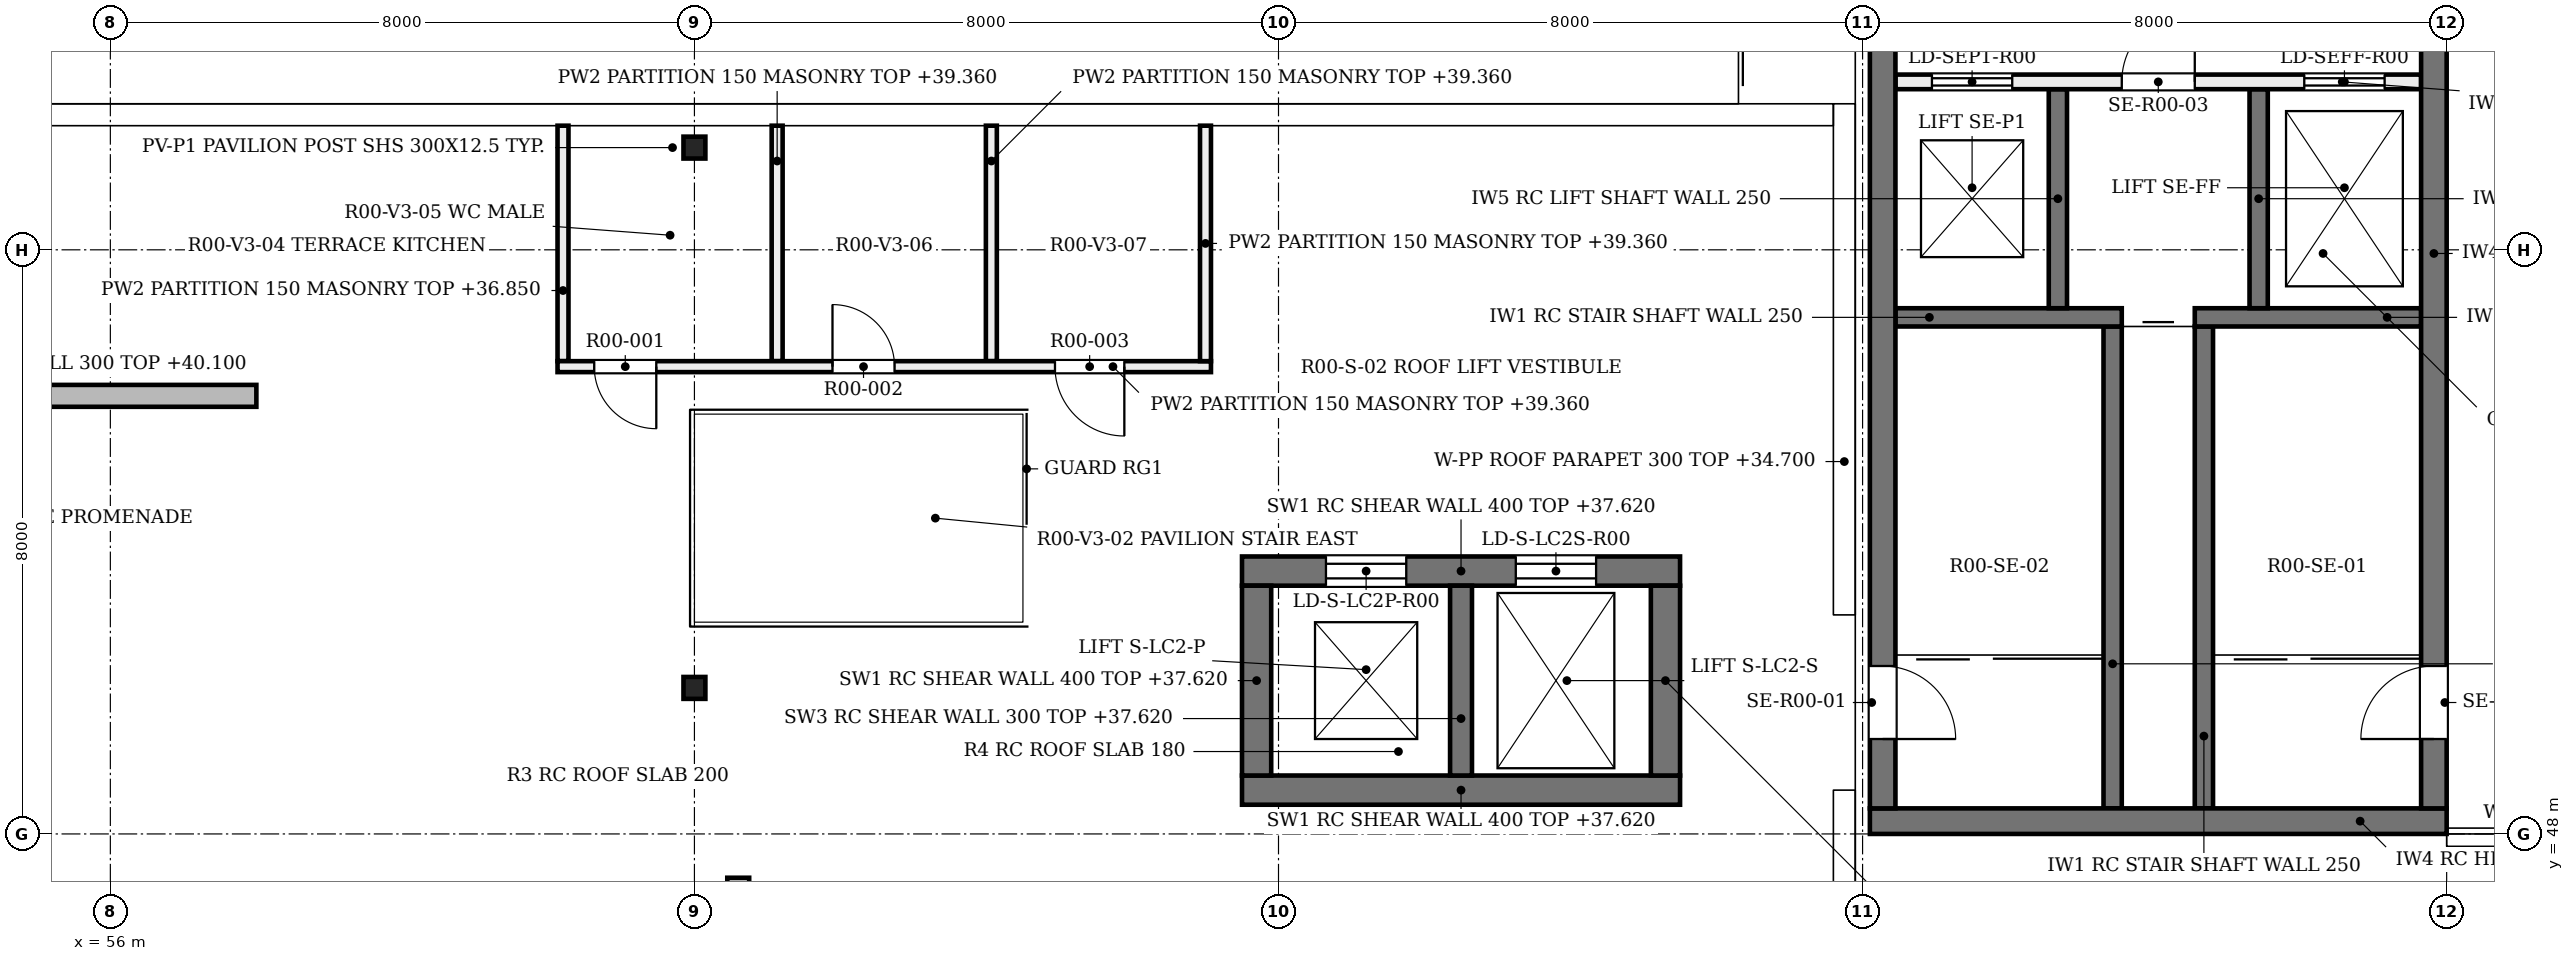
"""IFC4 building model, lengths in metres.
Left out: names, types, materials, properties, quantities, classifications, styles, units other than length and angle.
Written with IfcOpenShell. Run it as: python <this file> out.ifc"""

import sys

from ifc_helpers import new_model, si_unit, direction, frame, frame_2d, origin, origin_2d, place, context, subcontext, project, spatial, polyline, rectangle, hollow_rectangle, outline, extrude, element, fill, save


model = new_model("IFC4")
c1 = context("Model", 3, precision=1e-05, world=origin(), true_north=direction((0.0, 1.0)))
c2 = subcontext(c1, "Body", "Model", "MODEL_VIEW")
j1 = project(units=[si_unit("LENGTHUNIT", "METRE"), si_unit("PLANEANGLEUNIT", "RADIAN")], contexts=[c1])
p1 = place(None, origin())
s1 = spatial("IfcSite", under=j1, at=p1, CompositionType="ELEMENT")
p2 = place(p1, origin())
s2 = spatial("IfcBuilding", under=s1, at=p2, CompositionType="ELEMENT")
p3 = place(p2, frame((0.0, 0.0, 33.6)))
s3 = spatial("IfcBuildingStorey", under=s2, at=p3, CompositionType="ELEMENT", Elevation=33.6)
p4 = place(p3, frame((71.5, 48.6, 0.0), z_axis=(0.0, 0.0, 1.0), x_axis=(1.0, 0.0, 0.0)))
e1 = element("IfcWall", 1, at=p4, inside=s3, PredefinedType="SHEAR", context=c2, shape_type="SweptSolid", body=[
    extrude(rectangle(XDim=6.0, YDim=0.4, at=frame_2d((3.0, 0.0))), origin(), (0.0, 0.0, 1.0), 4.02),
])
p5 = place(p3, frame((71.5, 51.6, 0.0), z_axis=(0.0, 0.0, 1.0), x_axis=(1.0, 0.0, 0.0)))
e2 = element("IfcWall", 2, at=p5, inside=s3, PredefinedType="SHEAR", context=c2, shape_type="SweptSolid", body=[
    extrude(rectangle(XDim=6.0, YDim=0.4, at=frame_2d((3.0, 0.0))), origin(), (0.0, 0.0, 1.0), 4.02),
])
p6 = place(p5, frame((1.15, 0.0, 0.0)))
e3 = element("IfcOpeningElement", 3, at=p6, cuts=e2, PredefinedType="OPENING", context=c2, shape_type="SweptSolid", body=[
    extrude(rectangle(XDim=1.1, YDim=2.1, at=frame_2d((0.55, 1.05))), frame((0.0, 0.21, 0.0), z_axis=(0.0, -1.0, 0.0), x_axis=(1.0, 0.0, 0.0)), (0.0, 0.0, 1.0), 0.42),
])
p7 = place(p5, frame((3.75, 0.0, 0.0)))
e4 = element("IfcOpeningElement", 4, at=p7, cuts=e2, PredefinedType="OPENING", context=c2, shape_type="SweptSolid", body=[
    extrude(rectangle(XDim=1.1, YDim=2.1, at=frame_2d((0.55, 1.05))), frame((0.0, 0.21, 0.0), z_axis=(0.0, -1.0, 0.0), x_axis=(1.0, 0.0, 0.0)), (0.0, 0.0, 1.0), 0.42),
])
for number, where, z_axis, x_axis in (
    (5, (71.7, 48.8, 0.0), (0.0, 0.0, 1.0), (0.0, 1.0, 0.0)),
    (6, (77.3, 48.8, 0.0), (0.0, 0.0, 1.0), (0.0, 1.0, 0.0)),
):
    element("IfcWall", number, at=place(p3, frame(where, z_axis=z_axis, x_axis=x_axis)), inside=s3, PredefinedType="SHEAR", context=c2, shape_type="SweptSolid", body=[
        extrude(rectangle(XDim=2.6, YDim=0.4, at=frame_2d((1.3, 0.0))), origin(), (0.0, 0.0, 1.0), 4.02),
    ])
p8 = place(p3, frame((74.5, 48.8, 0.0), z_axis=(0.0, 0.0, 1.0), x_axis=(0.0, 1.0, 0.0)))
e7 = element("IfcWall", 7, at=p8, inside=s3, PredefinedType="SHEAR", context=c2, shape_type="SweptSolid", body=[
    extrude(rectangle(XDim=2.6, YDim=0.3, at=frame_2d((1.3, 0.0))), origin(), (0.0, 0.0, 1.0), 4.02),
])
for number, where, z_axis, x_axis in (
    (8, (64.0, 50.0, 0.0), (0.0, 0.0, 1.0), (1.0, 0.0, 0.0)),
    (9, (64.0, 57.4, 0.0), (0.0, 0.0, 1.0), (1.0, 0.0, 0.0)),
):
    element("IfcColumn", number, at=place(p3, frame(where, z_axis=z_axis, x_axis=x_axis)), inside=s3, PredefinedType="COLUMN", context=c2, shape_type="SweptSolid", body=[
        extrude(hollow_rectangle(XDim=0.3, YDim=0.3, WallThickness=0.012, InnerFilletRadius=0.012, OuterFilletRadius=0.019, at=origin_2d()), origin(), (0.0, 0.0, 1.0), 3.5),
    ])
p9 = place(p3, frame((64.6, 42.4, 0.0), z_axis=(0.0, 0.0, 1.0), x_axis=(0.0, 1.0, 0.0)))
e10 = element("IfcWall", 10, at=p9, inside=s3, PredefinedType="SOLIDWALL", context=c2, shape_type="SweptSolid", body=[
    extrude(outline(polyline([(0.0, 0.0), (5.0, 0.0), (5.0, 12.8), (1.6, 16.8), (0.0, 17.4), (0.0, 0.0)])), frame((0.0, 0.15, 0.0), z_axis=(0.0, -1.0, 0.0), x_axis=(1.0, 0.0, 0.0)), (0.0, 0.0, 1.0), 0.3),
])
p10 = place(p3, frame((88.0, 47.955, 0.0), z_axis=(0.0, 0.0, 1.0), x_axis=(1.0, 0.0, 0.0)))
e11 = element("IfcWall", 11, at=p10, inside=s3, PredefinedType="PARAPET", context=c2, shape_type="SweptSolid", body=[
    extrude(rectangle(XDim=8.0, YDim=0.25, at=frame_2d((4.0, 0.0))), origin(), (0.0, 0.0, 1.0), 1.1),
])
p11 = place(p3, frame((79.75, 42.0, 0.0), z_axis=(0.0, 0.0, 1.0), x_axis=(0.0, 1.0, 0.0)))
e12 = element("IfcWall", 12, at=p11, inside=s3, PredefinedType="PARAPET", context=c2, shape_type="SweptSolid", body=[
    extrude(rectangle(XDim=6.6, YDim=0.3, at=frame_2d((3.3, 0.0))), origin(), (0.0, 0.0, 1.0), 1.1),
])
p12 = place(p3, frame((79.75, 51.0, 0.0), z_axis=(0.0, 0.0, 1.0), x_axis=(0.0, 1.0, 0.0)))
e13 = element("IfcWall", 13, at=p12, inside=s3, PredefinedType="PARAPET", context=c2, shape_type="SweptSolid", body=[
    extrude(rectangle(XDim=7.0, YDim=0.3, at=frame_2d((3.5, 0.0))), origin(), (0.0, 0.0, 1.0), 1.1),
])
p13 = place(p3, frame((24.4, 57.85, 0.0), z_axis=(0.0, 0.0, 1.0), x_axis=(1.0, 0.0, 0.0)))
e14 = element("IfcWall", 14, at=p13, inside=s3, PredefinedType="PARAPET", context=c2, shape_type="SweptSolid", body=[
    extrude(rectangle(XDim=55.2, YDim=0.3, at=frame_2d((27.6, 0.0))), origin(), (0.0, 0.0, 1.0), 1.1),
])
p14 = place(p3, frame((46.0, 54.0, 0.0), z_axis=(0.0, 0.0, 1.0), x_axis=(1.0, 0.0, 0.0)))
e15 = element("IfcWall", 15, at=p14, inside=s3, PredefinedType="SOLIDWALL", context=c2, shape_type="SweptSolid", body=[
    extrude(rectangle(XDim=12.0, YDim=0.3, at=frame_2d((6.0, 0.0))), origin(), (0.0, 0.0, 1.0), 6.5),
])
for number, where, z_axis, x_axis in (
    (16, (84.675, 48.35, 0.0), (0.0, 0.0, 1.0), (0.0, 1.0, 0.0)),
    (17, (83.425, 48.35, 0.0), (0.0, 0.0, 1.0), (0.0, 1.0, 0.0)),
):
    element("IfcWall", number, at=place(p3, frame(where, z_axis=z_axis, x_axis=x_axis)), inside=s3, PredefinedType="SOLIDWALL", context=c2, shape_type="SweptSolid", body=[
        extrude(rectangle(XDim=6.6, YDim=0.25, at=frame_2d((3.3, 0.0))), origin(), (0.0, 0.0, 1.0), 4.5),
    ])
p15 = place(p3, frame((87.65, 55.075, 0.0), z_axis=(0.0, 0.0, 1.0), x_axis=(-1.0, 0.0, 0.0)))
e18 = element("IfcWall", 18, at=p15, inside=s3, PredefinedType="SOLIDWALL", context=c2, shape_type="SweptSolid", body=[
    extrude(rectangle(XDim=3.1, YDim=0.25, at=frame_2d((1.55, 0.0))), origin(), (0.0, 0.0, 1.0), 4.5),
])
p16 = place(p3, frame((83.55, 55.075, 0.0), z_axis=(0.0, 0.0, 1.0), x_axis=(-1.0, 0.0, 0.0)))
e19 = element("IfcWall", 19, at=p16, inside=s3, PredefinedType="SOLIDWALL", context=c2, shape_type="SweptSolid", body=[
    extrude(rectangle(XDim=3.1, YDim=0.25, at=frame_2d((1.55, 0.0))), origin(), (0.0, 0.0, 1.0), 4.5),
])
for number, where, z_axis, x_axis in (
    (20, (85.425, 55.2, 0.0), (0.0, 0.0, 1.0), (0.0, 1.0, 0.0)),
    (21, (82.675, 55.2, 0.0), (0.0, 0.0, 1.0), (0.0, 1.0, 0.0)),
):
    element("IfcWall", number, at=place(p3, frame(where, z_axis=z_axis, x_axis=x_axis)), inside=s3, PredefinedType="SOLIDWALL", context=c2, shape_type="SweptSolid", body=[
        extrude(rectangle(XDim=3.0, YDim=0.25, at=frame_2d((1.5, 0.0))), origin(), (0.0, 0.0, 1.0), 4.5),
    ])
p17 = place(p3, frame((87.65, 58.3, 0.0), z_axis=(0.0, 0.0, 1.0), x_axis=(-1.0, 0.0, 0.0)))
e22 = element("IfcWall", 22, at=p17, inside=s3, PredefinedType="SOLIDWALL", context=c2, shape_type="SweptSolid", body=[
    extrude(rectangle(XDim=7.2, YDim=0.2, at=frame_2d((3.6, 0.0))), origin(), (0.0, 0.0, 1.0), 4.5),
])
p18 = place(p17, frame((0.5, 0.0, 0.0)))
e23 = element("IfcOpeningElement", 23, at=p18, cuts=e22, PredefinedType="OPENING", context=c2, shape_type="SweptSolid", body=[
    extrude(rectangle(XDim=1.1, YDim=2.1, at=frame_2d((0.55, 1.05))), frame((0.0, 0.11, 0.0), z_axis=(0.0, -1.0, 0.0), x_axis=(1.0, 0.0, 0.0)), (0.0, 0.0, 1.0), 0.22),
])
p19 = place(p17, frame((5.6, 0.0, 0.0)))
e24 = element("IfcOpeningElement", 24, at=p19, cuts=e22, PredefinedType="OPENING", context=c2, shape_type="SweptSolid", body=[
    extrude(rectangle(XDim=1.1, YDim=2.1, at=frame_2d((0.55, 1.05))), frame((0.0, 0.11, 0.0), z_axis=(0.0, -1.0, 0.0), x_axis=(1.0, 0.0, 0.0)), (0.0, 0.0, 1.0), 0.22),
])
p20 = place(p17, frame((3.1, 0.0, 0.0)))
e25 = element("IfcOpeningElement", 25, at=p20, cuts=e22, PredefinedType="OPENING", context=c2, shape_type="SweptSolid", body=[
    extrude(rectangle(XDim=1.0, YDim=2.1, at=frame_2d((0.5, 1.05))), frame((0.0, 0.11, 0.0), z_axis=(0.0, -1.0, 0.0), x_axis=(1.0, 0.0, 0.0)), (0.0, 0.0, 1.0), 0.22),
])
p21 = place(p3, frame((88.0, 48.175, 0.0), z_axis=(0.0, 0.0, 1.0), x_axis=(-1.0, 0.0, 0.0)))
e26 = element("IfcWall", 26, at=p21, inside=s3, PredefinedType="SOLIDWALL", context=c2, shape_type="SweptSolid", body=[
    extrude(rectangle(XDim=7.9, YDim=0.35, at=frame_2d((3.95, 0.0))), origin(), (0.0, 0.0, 1.0), 4.5),
])
p22 = place(p3, frame((87.825, 48.35, 0.0), z_axis=(0.0, 0.0, 1.0), x_axis=(0.0, 1.0, 0.0)))
e27 = element("IfcWall", 27, at=p22, inside=s3, PredefinedType="SOLIDWALL", context=c2, shape_type="SweptSolid", body=[
    extrude(rectangle(XDim=15.2, YDim=0.35, at=frame_2d((7.6, 0.0))), origin(), (0.0, 0.0, 1.0), 4.5),
])
p23 = place(p22, frame((0.95, 0.0, 0.0)))
e28 = element("IfcOpeningElement", 28, at=p23, cuts=e27, PredefinedType="OPENING", context=c2, shape_type="SweptSolid", body=[
    extrude(rectangle(XDim=1.0, YDim=2.1, at=frame_2d((0.5, 1.05))), frame((0.0, 0.185, 0.0), z_axis=(0.0, -1.0, 0.0), x_axis=(1.0, 0.0, 0.0)), (0.0, 0.0, 1.0), 0.37),
])
p24 = place(p22, frame((10.6, 0.0, 0.0)))
e29 = element("IfcOpeningElement", 29, at=p24, cuts=e27, PredefinedType="OPENING", context=c2, shape_type="SweptSolid", body=[
    extrude(rectangle(XDim=1.4, YDim=2.1, at=frame_2d((0.7, 1.05))), frame((0.0, 0.185, 0.0), z_axis=(0.0, -1.0, 0.0), x_axis=(1.0, 0.0, 0.0)), (0.0, 0.0, 1.0), 0.37),
])
p25 = place(p3, frame((80.275, 48.35, 0.0), z_axis=(0.0, 0.0, 1.0), x_axis=(0.0, 1.0, 0.0)))
e30 = element("IfcWall", 30, at=p25, inside=s3, PredefinedType="SOLIDWALL", context=c2, shape_type="SweptSolid", body=[
    extrude(rectangle(XDim=15.2, YDim=0.35, at=frame_2d((7.6, 0.0))), origin(), (0.0, 0.0, 1.0), 4.5),
])
p26 = place(p25, frame((0.95, 0.0, 0.0)))
e31 = element("IfcOpeningElement", 31, at=p26, cuts=e30, PredefinedType="OPENING", context=c2, shape_type="SweptSolid", body=[
    extrude(rectangle(XDim=1.0, YDim=2.1, at=frame_2d((0.5, 1.05))), frame((0.0, 0.185, 0.0), z_axis=(0.0, -1.0, 0.0), x_axis=(1.0, 0.0, 0.0)), (0.0, 0.0, 1.0), 0.37),
])
p27 = place(p25, frame((10.6, 0.0, 0.0)))
e32 = element("IfcOpeningElement", 32, at=p27, cuts=e30, PredefinedType="OPENING", context=c2, shape_type="SweptSolid", body=[
    extrude(rectangle(XDim=1.4, YDim=2.1, at=frame_2d((0.7, 1.05))), frame((0.0, 0.185, 0.0), z_axis=(0.0, -1.0, 0.0), x_axis=(1.0, 0.0, 0.0)), (0.0, 0.0, 1.0), 0.37),
])
for number, where, z_axis, x_axis in (
    (33, (65.133, 54.475, 0.0), (0.0, 0.0, 1.0), (0.0, 1.0, 0.0)),
    (34, (68.067, 54.475, 0.0), (0.0, 0.0, 1.0), (0.0, 1.0, 0.0)),
):
    element("IfcWall", number, at=place(p3, frame(where, z_axis=z_axis, x_axis=x_axis)), inside=s3, PredefinedType="PARTITIONING", context=c2, shape_type="SweptSolid", body=[
        extrude(rectangle(XDim=3.225, YDim=0.15, at=frame_2d((1.612, 0.0))), origin(), (0.0, 0.0, 1.0), 5.76),
    ])
p28 = place(p3, frame((62.2, 54.475, 0.0), z_axis=(0.0, 0.0, 1.0), x_axis=(0.0, 1.0, 0.0)))
e35 = element("IfcWall", 35, at=p28, inside=s3, PredefinedType="PARTITIONING", context=c2, shape_type="SweptSolid", body=[
    extrude(rectangle(XDim=3.225, YDim=0.15, at=frame_2d((1.612, 0.0))), origin(), (0.0, 0.0, 1.0), 3.25),
])
p29 = place(p3, frame((62.125, 54.4, 0.0), z_axis=(0.0, 0.0, 1.0), x_axis=(1.0, 0.0, 0.0)))
e36 = element("IfcWall", 36, at=p29, inside=s3, PredefinedType="PARTITIONING", context=c2, shape_type="SweptSolid", body=[
    extrude(rectangle(XDim=8.95, YDim=0.15, at=frame_2d((4.475, 0.0))), origin(), (0.0, 0.0, 1.0), 5.76),
])
p30 = place(p29, frame((0.503, 0.0, 0.0)))
e37 = element("IfcOpeningElement", 37, at=p30, cuts=e36, PredefinedType="OPENING", context=c2, shape_type="SweptSolid", body=[
    extrude(rectangle(XDim=0.85, YDim=2.1, at=frame_2d((0.425, 1.05))), frame((0.0, 0.085, 0.0), z_axis=(0.0, -1.0, 0.0), x_axis=(1.0, 0.0, 0.0)), (0.0, 0.0, 1.0), 0.17),
])
p31 = place(p29, frame((3.766, 0.0, 0.0)))
e38 = element("IfcOpeningElement", 38, at=p31, cuts=e36, PredefinedType="OPENING", context=c2, shape_type="SweptSolid", body=[
    extrude(rectangle(XDim=0.85, YDim=2.1, at=frame_2d((0.425, 1.05))), frame((0.0, 0.085, 0.0), z_axis=(0.0, -1.0, 0.0), x_axis=(1.0, 0.0, 0.0)), (0.0, 0.0, 1.0), 0.17),
])
p32 = place(p29, frame((6.813, 0.0, 0.0)))
e39 = element("IfcOpeningElement", 39, at=p32, cuts=e36, PredefinedType="OPENING", context=c2, shape_type="SweptSolid", body=[
    extrude(rectangle(XDim=0.95, YDim=2.1, at=frame_2d((0.475, 1.05))), frame((0.0, 0.085, 0.0), z_axis=(0.0, -1.0, 0.0), x_axis=(1.0, 0.0, 0.0)), (0.0, 0.0, 1.0), 0.17),
])
p33 = place(p3, frame((71.0, 54.475, 0.0), z_axis=(0.0, 0.0, 1.0), x_axis=(0.0, 1.0, 0.0)))
e40 = element("IfcWall", 40, at=p33, inside=s3, PredefinedType="PARTITIONING", context=c2, shape_type="SweptSolid", body=[
    extrude(rectangle(XDim=3.225, YDim=0.15, at=frame_2d((1.612, 0.0))), origin(), (0.0, 0.0, 1.0), 5.76),
])
p34 = place(p26, frame((1.0, 0.0, 0.0), z_axis=(0.0, 0.0, 1.0), x_axis=(-1.0, 0.0, 0.0)))
e41 = element("IfcDoor", 41, at=p34, inside=s3, OperationType="SINGLE_SWING_LEFT", PredefinedType="DOOR", context=c2, shape_type="SweptSolid", body=[
    extrude(rectangle(XDim=1.0, YDim=2.1, at=frame_2d((0.5, 1.05))), frame((0.0, 0.025, 0.0), z_axis=(0.0, -1.0, 0.0), x_axis=(1.0, 0.0, 0.0)), (0.0, 0.0, 1.0), 0.05),
])
fill(e31, e41)
p35 = place(p23, origin())
e42 = element("IfcDoor", 42, at=p35, inside=s3, OperationType="SINGLE_SWING_LEFT", PredefinedType="DOOR", context=c2, shape_type="SweptSolid", body=[
    extrude(rectangle(XDim=1.0, YDim=2.1, at=frame_2d((0.5, 1.05))), frame((0.0, 0.025, 0.0), z_axis=(0.0, -1.0, 0.0), x_axis=(1.0, 0.0, 0.0)), (0.0, 0.0, 1.0), 0.05),
])
fill(e28, e42)
p36 = place(p18, frame((1.1, 0.0, 0.0), z_axis=(0.0, 0.0, 1.0), x_axis=(-1.0, 0.0, 0.0)))
e43 = element("IfcDoor", 43, at=p36, inside=s3, OperationType="DOUBLE_DOOR_SLIDING", PredefinedType="DOOR", context=c2, shape_type="SweptSolid", body=[
    extrude(rectangle(XDim=1.1, YDim=2.1, at=frame_2d((0.55, 1.05))), frame((0.0, 0.025, 0.0), z_axis=(0.0, -1.0, 0.0), x_axis=(1.0, 0.0, 0.0)), (0.0, 0.0, 1.0), 0.05),
])
fill(e23, e43)
p37 = place(p19, frame((1.1, 0.0, 0.0), z_axis=(0.0, 0.0, 1.0), x_axis=(-1.0, 0.0, 0.0)))
e44 = element("IfcDoor", 44, at=p37, inside=s3, OperationType="DOUBLE_DOOR_SLIDING", PredefinedType="DOOR", context=c2, shape_type="SweptSolid", body=[
    extrude(rectangle(XDim=1.1, YDim=2.1, at=frame_2d((0.55, 1.05))), frame((0.0, 0.025, 0.0), z_axis=(0.0, -1.0, 0.0), x_axis=(1.0, 0.0, 0.0)), (0.0, 0.0, 1.0), 0.05),
])
fill(e24, e44)
p38 = place(p20, frame((1.0, 0.0, 0.0), z_axis=(0.0, 0.0, 1.0), x_axis=(-1.0, 0.0, 0.0)))
e45 = element("IfcDoor", 45, at=p38, inside=s3, OperationType="SINGLE_SWING_LEFT", PredefinedType="DOOR", context=c2, shape_type="SweptSolid", body=[
    extrude(rectangle(XDim=1.0, YDim=2.1, at=frame_2d((0.5, 1.05))), frame((0.0, 0.025, 0.0), z_axis=(0.0, -1.0, 0.0), x_axis=(1.0, 0.0, 0.0)), (0.0, 0.0, 1.0), 0.05),
])
fill(e25, e45)
p39 = place(p6, origin())
e46 = element("IfcDoor", 46, at=p39, inside=s3, OperationType="DOUBLE_DOOR_SLIDING", PredefinedType="DOOR", context=c2, shape_type="SweptSolid", body=[
    extrude(rectangle(XDim=1.1, YDim=2.1, at=frame_2d((0.55, 1.05))), frame((0.0, 0.025, 0.0), z_axis=(0.0, -1.0, 0.0), x_axis=(1.0, 0.0, 0.0)), (0.0, 0.0, 1.0), 0.05),
])
fill(e3, e46)
p40 = place(p7, origin())
e47 = element("IfcDoor", 47, at=p40, inside=s3, OperationType="DOUBLE_DOOR_SLIDING", PredefinedType="DOOR", context=c2, shape_type="SweptSolid", body=[
    extrude(rectangle(XDim=1.1, YDim=2.1, at=frame_2d((0.55, 1.05))), frame((0.0, 0.025, 0.0), z_axis=(0.0, -1.0, 0.0), x_axis=(1.0, 0.0, 0.0)), (0.0, 0.0, 1.0), 0.05),
])
fill(e4, e47)
p41 = place(p30, origin())
e48 = element("IfcDoor", 48, at=p41, inside=s3, OperationType="SINGLE_SWING_RIGHT", PredefinedType="DOOR", context=c2, shape_type="SweptSolid", body=[
    extrude(rectangle(XDim=0.85, YDim=2.1, at=frame_2d((0.425, 1.05))), frame((0.0, 0.025, 0.0), z_axis=(0.0, -1.0, 0.0), x_axis=(1.0, 0.0, 0.0)), (0.0, 0.0, 1.0), 0.05),
])
fill(e37, e48)
p42 = place(p31, origin())
e49 = element("IfcDoor", 49, at=p42, inside=s3, OperationType="SINGLE_SWING_LEFT", PredefinedType="DOOR", context=c2, shape_type="SweptSolid", body=[
    extrude(rectangle(XDim=0.85, YDim=2.1, at=frame_2d((0.425, 1.05))), frame((0.0, 0.025, 0.0), z_axis=(0.0, -1.0, 0.0), x_axis=(1.0, 0.0, 0.0)), (0.0, 0.0, 1.0), 0.05),
])
fill(e38, e49)
p43 = place(p32, origin())
e50 = element("IfcDoor", 50, at=p43, inside=s3, OperationType="SINGLE_SWING_RIGHT", PredefinedType="DOOR", context=c2, shape_type="SweptSolid", body=[
    extrude(rectangle(XDim=0.95, YDim=2.1, at=frame_2d((0.475, 1.05))), frame((0.0, 0.025, 0.0), z_axis=(0.0, -1.0, 0.0), x_axis=(1.0, 0.0, 0.0)), (0.0, 0.0, 1.0), 0.05),
])
fill(e39, e50)
save(model, sys.argv[1])
